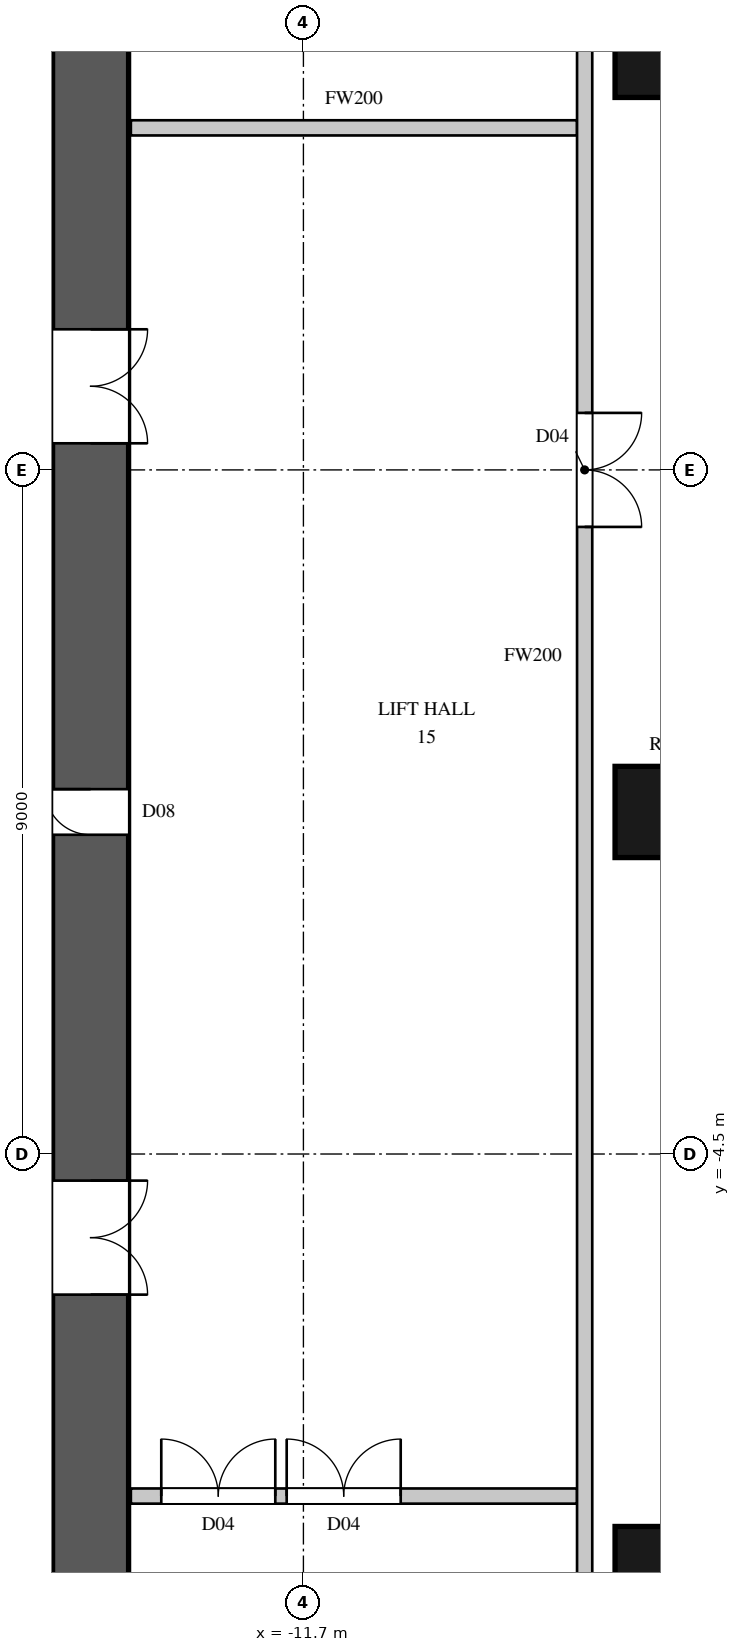
"""IFC4 building model, lengths in metres.
Left out: names, types, materials, properties, quantities, classifications, styles, units other than length and angle.
Written with IfcOpenShell. Run it as: python <this file> out.ifc"""

import sys

from ifc_helpers import new_model, si_unit, direction, frame, frame_2d, origin, origin_2d, place, context, subcontext, project, spatial, rectangle, circle, extrude, element, fill, save


model = new_model("IFC4")
c1 = context("Model", 3, precision=1e-05, world=origin(), true_north=direction((0.0, 1.0)))
c2 = subcontext(c1, "Body", "Model", "MODEL_VIEW")
j1 = project(units=[si_unit("LENGTHUNIT", "METRE"), si_unit("PLANEANGLEUNIT", "RADIAN")], contexts=[c1])
p1 = place(None, origin())
s1 = spatial("IfcSite", under=j1, at=p1, CompositionType="ELEMENT")
p2 = place(p1, origin())
s2 = spatial("IfcBuilding", under=s1, at=p2, CompositionType="ELEMENT")
p3 = place(p2, frame((0.0, 0.0, 84.3)))
s3 = spatial("IfcBuildingStorey", under=s2, at=p3, CompositionType="ELEMENT", Elevation=84.3)
for number, where, z_axis, x_axis in (
    (1, (-7.0, -10.0, 0.0), (0.0, 0.0, 1.0), (1.0, 0.0, 0.0)),
    (2, (-7.0, 0.0, 0.0), (0.0, 0.0, 1.0), (1.0, 0.0, 0.0)),
    (3, (-7.0, 10.0, 0.0), (0.0, 0.0, 1.0), (1.0, 0.0, 0.0)),
):
    element("IfcColumn", number, at=place(p3, frame(where, z_axis=z_axis, x_axis=x_axis)), inside=s3, PredefinedType="COLUMN", context=c2, shape_type="SweptSolid", body=[
        extrude(circle(Radius=0.6, at=origin_2d()), origin(), (0.0, 0.0, 1.0), 3.6),
    ])
p4 = place(p3, frame((-14.5, -14.8, 0.0), z_axis=(0.0, 0.0, 1.0), x_axis=(0.0, 1.0, 0.0)))
e4 = element("IfcWall", 4, at=p4, inside=s3, PredefinedType="SHEAR", context=c2, shape_type="SweptSolid", body=[
    extrude(rectangle(XDim=29.6, YDim=1.0, at=frame_2d((14.8, 0.0))), origin(), (0.0, 0.0, 1.0), 3.6),
])
p5 = place(p4, frame((8.45, 0.0, 0.0)))
e5 = element("IfcOpeningElement", 5, at=p5, cuts=e4, PredefinedType="OPENING", context=c2, shape_type="SweptSolid", body=[
    extrude(rectangle(XDim=1.5, YDim=2.4, at=frame_2d((0.75, 1.2))), frame((0.0, 0.51, 0.0), z_axis=(0.0, -1.0, 0.0), x_axis=(1.0, 0.0, 0.0)), (0.0, 0.0, 1.0), 1.02),
])
p6 = place(p4, frame((19.65, 0.0, 0.0)))
e6 = element("IfcOpeningElement", 6, at=p6, cuts=e4, PredefinedType="OPENING", context=c2, shape_type="SweptSolid", body=[
    extrude(rectangle(XDim=1.5, YDim=2.4, at=frame_2d((0.75, 1.2))), frame((0.0, 0.51, 0.0), z_axis=(0.0, -1.0, 0.0), x_axis=(1.0, 0.0, 0.0)), (0.0, 0.0, 1.0), 1.02),
])
p7 = place(p4, frame((14.5, 0.0, 0.0)))
e7 = element("IfcOpeningElement", 7, at=p7, cuts=e4, PredefinedType="OPENING", context=c2, shape_type="SweptSolid", body=[
    extrude(rectangle(XDim=0.6, YDim=2.0, at=frame_2d((0.3, 1.0))), frame((0.0, 0.51, 0.0), z_axis=(0.0, -1.0, 0.0), x_axis=(1.0, 0.0, 0.0)), (0.0, 0.0, 1.0), 1.02),
])
p8 = place(p3, frame((-13.97, -9.0, 0.0), z_axis=(0.0, 0.0, 1.0), x_axis=(1.0, 0.0, 0.0)))
e8 = element("IfcWall", 8, at=p8, inside=s3, PredefinedType="PARTITIONING", context=c2, shape_type="SweptSolid", body=[
    extrude(rectangle(XDim=5.87, YDim=0.2, at=frame_2d((2.935, 0.0))), origin(), (0.0, 0.0, 1.0), 3.3),
])
p9 = place(p8, frame((0.4, 0.0, 0.0)))
e9 = element("IfcOpeningElement", 9, at=p9, cuts=e8, PredefinedType="OPENING", context=c2, shape_type="SweptSolid", body=[
    extrude(rectangle(XDim=1.5, YDim=2.2, at=frame_2d((0.75, 1.1))), frame((0.0, 0.11, 0.0), z_axis=(0.0, -1.0, 0.0), x_axis=(1.0, 0.0, 0.0)), (0.0, 0.0, 1.0), 0.22),
])
p10 = place(p8, frame((2.05, 0.0, 0.0)))
e10 = element("IfcOpeningElement", 10, at=p10, cuts=e8, PredefinedType="OPENING", context=c2, shape_type="SweptSolid", body=[
    extrude(rectangle(XDim=1.5, YDim=2.2, at=frame_2d((0.75, 1.1))), frame((0.0, 0.11, 0.0), z_axis=(0.0, -1.0, 0.0), x_axis=(1.0, 0.0, 0.0)), (0.0, 0.0, 1.0), 0.22),
])
p11 = place(p3, frame((-13.97, 9.0, 0.0), z_axis=(0.0, 0.0, 1.0), x_axis=(1.0, 0.0, 0.0)))
e11 = element("IfcWall", 11, at=p11, inside=s3, PredefinedType="PARTITIONING", context=c2, shape_type="SweptSolid", body=[
    extrude(rectangle(XDim=5.87, YDim=0.2, at=frame_2d((2.935, 0.0))), origin(), (0.0, 0.0, 1.0), 3.3),
])
p12 = place(p3, frame((-8.0, -10.9, 0.0), z_axis=(0.0, 0.0, 1.0), x_axis=(0.0, 1.0, 0.0)))
e12 = element("IfcWall", 12, at=p12, inside=s3, PredefinedType="PARTITIONING", context=c2, shape_type="SweptSolid", body=[
    extrude(rectangle(XDim=25.9, YDim=0.2, at=frame_2d((12.95, 0.0))), origin(), (0.0, 0.0, 1.0), 3.3),
])
p13 = place(p12, frame((14.65, 0.0, 0.0)))
e13 = element("IfcOpeningElement", 13, at=p13, cuts=e12, PredefinedType="OPENING", context=c2, shape_type="SweptSolid", body=[
    extrude(rectangle(XDim=1.5, YDim=2.2, at=frame_2d((0.75, 1.1))), frame((0.0, 0.11, 0.0), z_axis=(0.0, -1.0, 0.0), x_axis=(1.0, 0.0, 0.0)), (0.0, 0.0, 1.0), 0.22),
])
p14 = place(p12, frame((24.15, 0.0, 0.0)))
e14 = element("IfcOpeningElement", 14, at=p14, cuts=e12, PredefinedType="OPENING", context=c2, shape_type="SweptSolid", body=[
    extrude(rectangle(XDim=1.6, YDim=2.4, at=frame_2d((0.8, 1.2))), frame((0.0, 0.11, 0.0), z_axis=(0.0, -1.0, 0.0), x_axis=(1.0, 0.0, 0.0)), (0.0, 0.0, 1.0), 0.22),
])
p15 = place(p13, origin())
e15 = element("IfcDoor", 15, at=p15, inside=s3, OperationType="DOUBLE_DOOR_SINGLE_SWING", PredefinedType="DOOR", context=c2, shape_type="SweptSolid", body=[
    extrude(rectangle(XDim=1.5, YDim=2.2, at=frame_2d((0.75, 1.1))), frame((0.0, 0.025, 0.0), z_axis=(0.0, -1.0, 0.0), x_axis=(1.0, 0.0, 0.0)), (0.0, 0.0, 1.0), 0.05),
])
fill(e13, e15)
p16 = place(p9, origin())
e16 = element("IfcDoor", 16, at=p16, inside=s3, OperationType="DOUBLE_DOOR_SINGLE_SWING", PredefinedType="DOOR", context=c2, shape_type="SweptSolid", body=[
    extrude(rectangle(XDim=1.5, YDim=2.2, at=frame_2d((0.75, 1.1))), frame((0.0, 0.025, 0.0), z_axis=(0.0, -1.0, 0.0), x_axis=(1.0, 0.0, 0.0)), (0.0, 0.0, 1.0), 0.05),
])
fill(e9, e16)
p17 = place(p10, origin())
e17 = element("IfcDoor", 17, at=p17, inside=s3, OperationType="DOUBLE_DOOR_SINGLE_SWING", PredefinedType="DOOR", context=c2, shape_type="SweptSolid", body=[
    extrude(rectangle(XDim=1.5, YDim=2.2, at=frame_2d((0.75, 1.1))), frame((0.0, 0.025, 0.0), z_axis=(0.0, -1.0, 0.0), x_axis=(1.0, 0.0, 0.0)), (0.0, 0.0, 1.0), 0.05),
])
fill(e10, e17)
p18 = place(p5, origin())
e18 = element("IfcDoor", 18, at=p18, inside=s3, OperationType="DOUBLE_DOOR_SINGLE_SWING", PredefinedType="DOOR", context=c2, shape_type="SweptSolid", body=[
    extrude(rectangle(XDim=1.5, YDim=2.4, at=frame_2d((0.75, 1.2))), frame((0.0, -0.445, 0.0), z_axis=(0.0, -1.0, 0.0), x_axis=(1.0, 0.0, 0.0)), (0.0, 0.0, 1.0), 0.05),
])
fill(e5, e18)
p19 = place(p6, origin())
e19 = element("IfcDoor", 19, at=p19, inside=s3, OperationType="DOUBLE_DOOR_SINGLE_SWING", PredefinedType="DOOR", context=c2, shape_type="SweptSolid", body=[
    extrude(rectangle(XDim=1.5, YDim=2.4, at=frame_2d((0.75, 1.2))), frame((0.0, -0.445, 0.0), z_axis=(0.0, -1.0, 0.0), x_axis=(1.0, 0.0, 0.0)), (0.0, 0.0, 1.0), 0.05),
])
fill(e6, e19)
p20 = place(p7, origin())
e20 = element("IfcDoor", 20, at=p20, inside=s3, OperationType="SINGLE_SWING_RIGHT", PredefinedType="DOOR", context=c2, shape_type="SweptSolid", body=[
    extrude(rectangle(XDim=0.6, YDim=2.0, at=frame_2d((0.3, 1.0))), frame((0.0, 0.495, 0.0), z_axis=(0.0, -1.0, 0.0), x_axis=(1.0, 0.0, 0.0)), (0.0, 0.0, 1.0), 0.05),
])
fill(e7, e20)
save(model, sys.argv[1])
